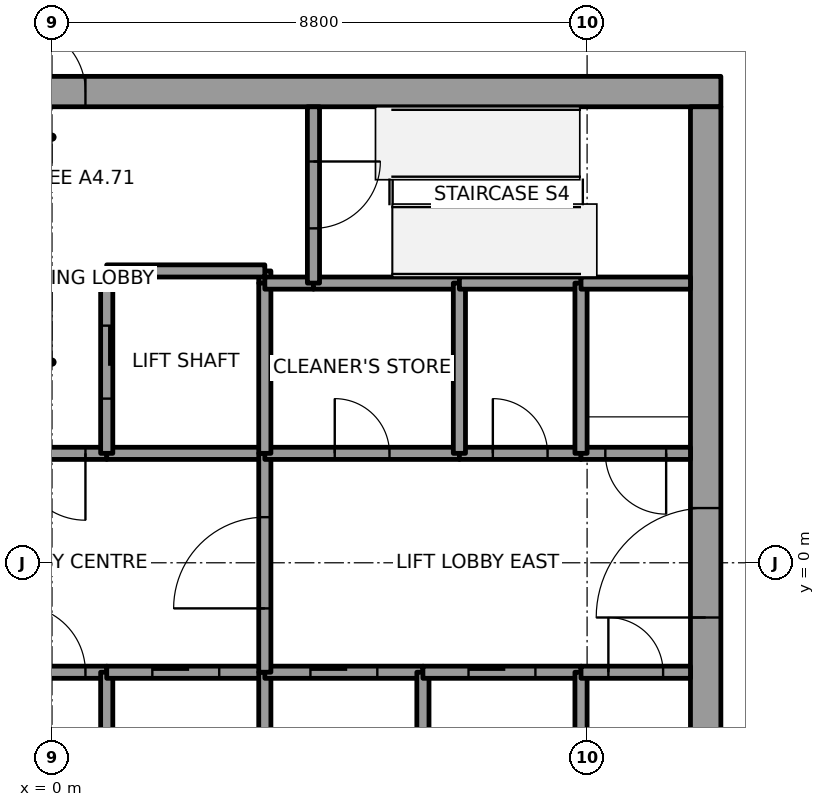
"""IFC4 building model, lengths in metres.
Left out: names, types, materials, properties, quantities, classifications, styles, units other than length and angle.
Written with IfcOpenShell. Run it as: python <this file> out.ifc"""

import sys

from ifc_helpers import new_model, si_unit, direction, frame, frame_2d, origin, place, context, subcontext, project, spatial, rectangle, extrude, element, fill, save


model = new_model("IFC4")
c1 = context("Model", 3, precision=1e-05, world=origin(), true_north=direction((0.0, 1.0)))
c2 = subcontext(c1, "Body", "Model", "MODEL_VIEW")
j1 = project(units=[si_unit("LENGTHUNIT", "METRE"), si_unit("PLANEANGLEUNIT", "RADIAN")], contexts=[c1])
p1 = place(None, origin())
s1 = spatial("IfcSite", under=j1, at=p1, CompositionType="ELEMENT")
p2 = place(p1, origin())
s2 = spatial("IfcBuilding", under=s1, at=p2, CompositionType="ELEMENT")
p3 = place(p2, frame((0.0, 0.0, 303.0)))
s3 = spatial("IfcBuildingStorey", under=s2, at=p3, CompositionType="ELEMENT", Elevation=303.0)
p4 = place(p3, frame((-11.0, 7.75, 0.0), z_axis=(0.0, 0.0, 1.0), x_axis=(1.0, 0.0, 0.0)))
e1 = element("IfcWall", 1, at=p4, inside=s3, PredefinedType="SHEAR", context=c2, shape_type="SweptSolid", body=[
    extrude(rectangle(XDim=22.0, YDim=0.5, at=frame_2d((11.0, 0.0))), origin(), (0.0, 0.0, 1.0), 4.0),
])
p5 = place(p4, frame((10.45, 0.0, 0.0)))
e2 = element("IfcOpeningElement", 2, at=p5, cuts=e1, PredefinedType="OPENING", context=c2, shape_type="SweptSolid", body=[
    extrude(rectangle(XDim=1.1, YDim=2.1, at=frame_2d((0.55, 1.05))), frame((0.0, 0.25, 0.0), z_axis=(0.0, -1.0, 0.0), x_axis=(1.0, 0.0, 0.0)), (0.0, 0.0, 1.0), 0.5),
])
p6 = place(p3, frame((10.75, -7.5, 0.0), z_axis=(0.0, 0.0, 1.0), x_axis=(0.0, 1.0, 0.0)))
e3 = element("IfcWall", 3, at=p6, inside=s3, PredefinedType="SHEAR", context=c2, shape_type="SweptSolid", body=[
    extrude(rectangle(XDim=15.0, YDim=0.5, at=frame_2d((7.5, 0.0))), origin(), (0.0, 0.0, 1.0), 4.0),
])
p7 = place(p6, frame((6.6, 0.0, 0.0)))
e4 = element("IfcOpeningElement", 4, at=p7, cuts=e3, PredefinedType="OPENING", context=c2, shape_type="SweptSolid", body=[
    extrude(rectangle(XDim=1.8, YDim=2.1, at=frame_2d((0.9, 1.05))), frame((0.0, 0.25, 0.0), z_axis=(0.0, -1.0, 0.0), x_axis=(1.0, 0.0, 0.0)), (0.0, 0.0, 1.0), 0.5),
])
p8 = place(p3, frame((-0.9, -1.8, 0.0), z_axis=(0.0, 0.0, 1.0), x_axis=(1.0, 0.0, 0.0)))
e5 = element("IfcWall", 5, at=p8, inside=s3, PredefinedType="SOLIDWALL", context=c2, shape_type="SweptSolid", body=[
    extrude(rectangle(XDim=1.8, YDim=0.2, at=frame_2d((0.9, 0.0))), origin(), (0.0, 0.0, 1.0), 3.85),
])
p9 = place(p8, frame((0.35, 0.0, 0.0)))
e6 = element("IfcOpeningElement", 6, at=p9, cuts=e5, PredefinedType="OPENING", context=c2, shape_type="SweptSolid", body=[
    extrude(rectangle(XDim=1.1, YDim=2.1, at=frame_2d((0.55, 1.05))), frame((0.0, 0.1, 0.0), z_axis=(0.0, -1.0, 0.0), x_axis=(1.0, 0.0, 0.0)), (0.0, 0.0, 1.0), 0.2),
])
p10 = place(p3, frame((0.9, 1.8, 0.0), z_axis=(0.0, 0.0, 1.0), x_axis=(-1.0, 0.0, 0.0)))
e7 = element("IfcWall", 7, at=p10, inside=s3, PredefinedType="SOLIDWALL", context=c2, shape_type="SweptSolid", body=[
    extrude(rectangle(XDim=1.8, YDim=0.2, at=frame_2d((0.9, 0.0))), origin(), (0.0, 0.0, 1.0), 3.85),
])
p11 = place(p10, frame((0.35, 0.0, 0.0)))
e8 = element("IfcOpeningElement", 8, at=p11, cuts=e7, PredefinedType="OPENING", context=c2, shape_type="SweptSolid", body=[
    extrude(rectangle(XDim=1.1, YDim=2.1, at=frame_2d((0.55, 1.05))), frame((0.0, 0.1, 0.0), z_axis=(0.0, -1.0, 0.0), x_axis=(1.0, 0.0, 0.0)), (0.0, 0.0, 1.0), 0.2),
])
p12 = place(p3, frame((0.9, -1.8, 0.0), z_axis=(0.0, 0.0, 1.0), x_axis=(0.0, -1.0, 0.0)))
e9 = element("IfcWall", 9, at=p12, inside=s3, PredefinedType="SOLIDWALL", context=c2, shape_type="SweptSolid", body=[
    extrude(rectangle(XDim=2.8, YDim=0.2, at=frame_2d((1.4, 0.0))), origin(), (0.0, 0.0, 1.0), 3.85),
])
p13 = place(p3, frame((0.9, -1.8, 0.0), z_axis=(0.0, 0.0, 1.0), x_axis=(1.0, 0.0, 0.0)))
e10 = element("IfcWall", 10, at=p13, inside=s3, PredefinedType="SOLIDWALL", context=c2, shape_type="SweptSolid", body=[
    extrude(rectangle(XDim=2.6, YDim=0.2, at=frame_2d((1.3, 0.0))), origin(), (0.0, 0.0, 1.0), 3.85),
])
p14 = place(p13, frame((0.75, 0.0, 0.0)))
e11 = element("IfcOpeningElement", 11, at=p14, cuts=e10, PredefinedType="OPENING", context=c2, shape_type="SweptSolid", body=[
    extrude(rectangle(XDim=1.1, YDim=2.1, at=frame_2d((0.55, 1.05))), frame((0.0, 0.1, 0.0), z_axis=(0.0, -1.0, 0.0), x_axis=(1.0, 0.0, 0.0)), (0.0, 0.0, 1.0), 0.2),
])
p15 = place(p3, frame((3.5, 1.8, 0.0), z_axis=(0.0, 0.0, 1.0), x_axis=(-1.0, 0.0, 0.0)))
e12 = element("IfcWall", 12, at=p15, inside=s3, PredefinedType="SOLIDWALL", context=c2, shape_type="SweptSolid", body=[
    extrude(rectangle(XDim=2.6, YDim=0.2, at=frame_2d((1.3, 0.0))), origin(), (0.0, 0.0, 1.0), 3.85),
])
p16 = place(p3, frame((3.5, 4.6, 0.0), z_axis=(0.0, 0.0, 1.0), x_axis=(0.0, 1.0, 0.0)))
e13 = element("IfcWall", 13, at=p16, inside=s3, PredefinedType="SOLIDWALL", context=c2, shape_type="SweptSolid", body=[
    extrude(rectangle(XDim=0.2, YDim=0.2, at=frame_2d((0.1, 0.0))), origin(), (0.0, 0.0, 1.0), 3.85),
])
p17 = place(p3, frame((3.5, 4.8, 0.0), z_axis=(0.0, 0.0, 1.0), x_axis=(-1.0, 0.0, 0.0)))
e14 = element("IfcWall", 14, at=p17, inside=s3, PredefinedType="SOLIDWALL", context=c2, shape_type="SweptSolid", body=[
    extrude(rectangle(XDim=2.6, YDim=0.2, at=frame_2d((1.3, 0.0))), origin(), (0.0, 0.0, 1.0), 3.85),
])
p18 = place(p3, frame((0.9, 4.8, 0.0), z_axis=(0.0, 0.0, 1.0), x_axis=(0.0, -1.0, 0.0)))
e15 = element("IfcWall", 15, at=p18, inside=s3, PredefinedType="SOLIDWALL", context=c2, shape_type="SweptSolid", body=[
    extrude(rectangle(XDim=3.0, YDim=0.2, at=frame_2d((1.5, 0.0))), origin(), (0.0, 0.0, 1.0), 3.85),
])
p19 = place(p18, frame((0.9, 0.0, 0.0)))
e16 = element("IfcOpeningElement", 16, at=p19, cuts=e15, PredefinedType="OPENING", context=c2, shape_type="SweptSolid", body=[
    extrude(rectangle(XDim=1.2, YDim=2.1, at=frame_2d((0.6, 1.05))), frame((0.0, 0.1, 0.0), z_axis=(0.0, -1.0, 0.0), x_axis=(1.0, 0.0, 0.0)), (0.0, 0.0, 1.0), 0.2),
])
p20 = place(p3, frame((3.5, -4.6, 0.0), z_axis=(0.0, 0.0, 1.0), x_axis=(0.0, 1.0, 0.0)))
e17 = element("IfcWall", 17, at=p20, inside=s3, PredefinedType="SOLIDWALL", context=c2, shape_type="SweptSolid", body=[
    extrude(rectangle(XDim=2.8, YDim=0.2, at=frame_2d((1.4, 0.0))), origin(), (0.0, 0.0, 1.0), 3.85),
])
p21 = place(p3, frame((3.5, -1.8, 0.0), z_axis=(0.0, 0.0, 1.0), x_axis=(1.0, 0.0, 0.0)))
e18 = element("IfcWall", 18, at=p21, inside=s3, PredefinedType="SOLIDWALL", context=c2, shape_type="SweptSolid", body=[
    extrude(rectangle(XDim=2.6, YDim=0.2, at=frame_2d((1.3, 0.0))), origin(), (0.0, 0.0, 1.0), 3.85),
])
p22 = place(p21, frame((0.75, 0.0, 0.0)))
e19 = element("IfcOpeningElement", 19, at=p22, cuts=e18, PredefinedType="OPENING", context=c2, shape_type="SweptSolid", body=[
    extrude(rectangle(XDim=1.1, YDim=2.1, at=frame_2d((0.55, 1.05))), frame((0.0, 0.1, 0.0), z_axis=(0.0, -1.0, 0.0), x_axis=(1.0, 0.0, 0.0)), (0.0, 0.0, 1.0), 0.2),
])
p23 = place(p3, frame((3.5, -1.8, 0.0), z_axis=(0.0, 0.0, 1.0), x_axis=(0.0, 1.0, 0.0)))
e20 = element("IfcWall", 20, at=p23, inside=s3, PredefinedType="SOLIDWALL", context=c2, shape_type="SweptSolid", body=[
    extrude(rectangle(XDim=3.6, YDim=0.2, at=frame_2d((1.8, 0.0))), origin(), (0.0, 0.0, 1.0), 3.85),
])
p24 = place(p23, frame((1.05, 0.0, 0.0)))
e21 = element("IfcOpeningElement", 21, at=p24, cuts=e20, PredefinedType="OPENING", context=c2, shape_type="SweptSolid", body=[
    extrude(rectangle(XDim=1.5, YDim=2.1, at=frame_2d((0.75, 1.05))), frame((0.0, 0.1, 0.0), z_axis=(0.0, -1.0, 0.0), x_axis=(1.0, 0.0, 0.0)), (0.0, 0.0, 1.0), 0.2),
])
p25 = place(p3, frame((3.5, 1.8, 0.0), z_axis=(0.0, 0.0, 1.0), x_axis=(1.0, 0.0, 0.0)))
e22 = element("IfcWall", 22, at=p25, inside=s3, PredefinedType="SOLIDWALL", context=c2, shape_type="SweptSolid", body=[
    extrude(rectangle(XDim=3.2, YDim=0.2, at=frame_2d((1.6, 0.0))), origin(), (0.0, 0.0, 1.0), 3.85),
])
p26 = place(p25, frame((1.15, 0.0, 0.0)))
e23 = element("IfcOpeningElement", 23, at=p26, cuts=e22, PredefinedType="OPENING", context=c2, shape_type="SweptSolid", body=[
    extrude(rectangle(XDim=0.9, YDim=2.1, at=frame_2d((0.45, 1.05))), frame((0.0, 0.1, 0.0), z_axis=(0.0, -1.0, 0.0), x_axis=(1.0, 0.0, 0.0)), (0.0, 0.0, 1.0), 0.2),
])
p27 = place(p3, frame((3.5, 4.6, 0.0), z_axis=(0.0, 0.0, 1.0), x_axis=(0.0, -1.0, 0.0)))
e24 = element("IfcWall", 24, at=p27, inside=s3, PredefinedType="SOLIDWALL", context=c2, shape_type="SweptSolid", body=[
    extrude(rectangle(XDim=2.8, YDim=0.2, at=frame_2d((1.4, 0.0))), origin(), (0.0, 0.0, 1.0), 3.85),
])
p28 = place(p3, frame((4.3, 4.6, 0.0), z_axis=(0.0, 0.0, 1.0), x_axis=(-1.0, 0.0, 0.0)))
e25 = element("IfcWall", 25, at=p28, inside=s3, PredefinedType="SOLIDWALL", context=c2, shape_type="SweptSolid", body=[
    extrude(rectangle(XDim=0.8, YDim=0.2, at=frame_2d((0.4, 0.0))), origin(), (0.0, 0.0, 1.0), 3.85),
])
p29 = place(p3, frame((6.7, 4.6, 0.0), z_axis=(0.0, 0.0, 1.0), x_axis=(-1.0, 0.0, 0.0)))
e26 = element("IfcWall", 26, at=p29, inside=s3, PredefinedType="SOLIDWALL", context=c2, shape_type="SweptSolid", body=[
    extrude(rectangle(XDim=2.4, YDim=0.2, at=frame_2d((1.2, 0.0))), origin(), (0.0, 0.0, 1.0), 3.85),
])
p30 = place(p3, frame((4.3, 7.5, 0.0), z_axis=(0.0, 0.0, 1.0), x_axis=(0.0, -1.0, 0.0)))
e27 = element("IfcWall", 27, at=p30, inside=s3, PredefinedType="SOLIDWALL", context=c2, shape_type="SweptSolid", body=[
    extrude(rectangle(XDim=2.9, YDim=0.2, at=frame_2d((1.45, 0.0))), origin(), (0.0, 0.0, 1.0), 3.85),
])
p31 = place(p30, frame((0.9, 0.0, 0.0)))
e28 = element("IfcOpeningElement", 28, at=p31, cuts=e27, PredefinedType="OPENING", context=c2, shape_type="SweptSolid", body=[
    extrude(rectangle(XDim=1.1, YDim=2.1, at=frame_2d((0.55, 1.05))), frame((0.0, 0.1, 0.0), z_axis=(0.0, -1.0, 0.0), x_axis=(1.0, 0.0, 0.0)), (0.0, 0.0, 1.0), 0.2),
])
p32 = place(p3, frame((6.1, -4.6, 0.0), z_axis=(0.0, 0.0, 1.0), x_axis=(0.0, 1.0, 0.0)))
e29 = element("IfcWall", 29, at=p32, inside=s3, PredefinedType="SOLIDWALL", context=c2, shape_type="SweptSolid", body=[
    extrude(rectangle(XDim=2.8, YDim=0.2, at=frame_2d((1.4, 0.0))), origin(), (0.0, 0.0, 1.0), 3.85),
])
p33 = place(p3, frame((6.1, -1.8, 0.0), z_axis=(0.0, 0.0, 1.0), x_axis=(1.0, 0.0, 0.0)))
e30 = element("IfcWall", 30, at=p33, inside=s3, PredefinedType="SOLIDWALL", context=c2, shape_type="SweptSolid", body=[
    extrude(rectangle(XDim=2.6, YDim=0.2, at=frame_2d((1.3, 0.0))), origin(), (0.0, 0.0, 1.0), 3.85),
])
p34 = place(p33, frame((0.75, 0.0, 0.0)))
e31 = element("IfcOpeningElement", 31, at=p34, cuts=e30, PredefinedType="OPENING", context=c2, shape_type="SweptSolid", body=[
    extrude(rectangle(XDim=1.1, YDim=2.1, at=frame_2d((0.55, 1.05))), frame((0.0, 0.1, 0.0), z_axis=(0.0, -1.0, 0.0), x_axis=(1.0, 0.0, 0.0)), (0.0, 0.0, 1.0), 0.2),
])
p35 = place(p3, frame((6.7, 1.8, 0.0), z_axis=(0.0, 0.0, 1.0), x_axis=(1.0, 0.0, 0.0)))
e32 = element("IfcWall", 32, at=p35, inside=s3, PredefinedType="SOLIDWALL", context=c2, shape_type="SweptSolid", body=[
    extrude(rectangle(XDim=2.0, YDim=0.2, at=frame_2d((1.0, 0.0))), origin(), (0.0, 0.0, 1.0), 3.85),
])
p36 = place(p35, frame((0.55, 0.0, 0.0)))
e33 = element("IfcOpeningElement", 33, at=p36, cuts=e32, PredefinedType="OPENING", context=c2, shape_type="SweptSolid", body=[
    extrude(rectangle(XDim=0.9, YDim=2.1, at=frame_2d((0.45, 1.05))), frame((0.0, 0.1, 0.0), z_axis=(0.0, -1.0, 0.0), x_axis=(1.0, 0.0, 0.0)), (0.0, 0.0, 1.0), 0.2),
])
p37 = place(p3, frame((6.7, 1.8, 0.0), z_axis=(0.0, 0.0, 1.0), x_axis=(0.0, 1.0, 0.0)))
e34 = element("IfcWall", 34, at=p37, inside=s3, PredefinedType="SOLIDWALL", context=c2, shape_type="SweptSolid", body=[
    extrude(rectangle(XDim=2.8, YDim=0.2, at=frame_2d((1.4, 0.0))), origin(), (0.0, 0.0, 1.0), 3.85),
])
p38 = place(p3, frame((8.7, 4.6, 0.0), z_axis=(0.0, 0.0, 1.0), x_axis=(-1.0, 0.0, 0.0)))
e35 = element("IfcWall", 35, at=p38, inside=s3, PredefinedType="SOLIDWALL", context=c2, shape_type="SweptSolid", body=[
    extrude(rectangle(XDim=2.0, YDim=0.2, at=frame_2d((1.0, 0.0))), origin(), (0.0, 0.0, 1.0), 3.85),
])
p39 = place(p3, frame((8.7, -1.8, 0.0), z_axis=(0.0, 0.0, 1.0), x_axis=(0.0, -1.0, 0.0)))
e36 = element("IfcWall", 36, at=p39, inside=s3, PredefinedType="SOLIDWALL", context=c2, shape_type="SweptSolid", body=[
    extrude(rectangle(XDim=2.8, YDim=0.2, at=frame_2d((1.4, 0.0))), origin(), (0.0, 0.0, 1.0), 3.85),
])
p40 = place(p3, frame((8.7, -1.8, 0.0), z_axis=(0.0, 0.0, 1.0), x_axis=(1.0, 0.0, 0.0)))
e37 = element("IfcWall", 37, at=p40, inside=s3, PredefinedType="SOLIDWALL", context=c2, shape_type="SweptSolid", body=[
    extrude(rectangle(XDim=1.8, YDim=0.2, at=frame_2d((0.9, 0.0))), origin(), (0.0, 0.0, 1.0), 3.85),
])
p41 = place(p40, frame((0.45, 0.0, 0.0)))
e38 = element("IfcOpeningElement", 38, at=p41, cuts=e37, PredefinedType="OPENING", context=c2, shape_type="SweptSolid", body=[
    extrude(rectangle(XDim=0.9, YDim=2.1, at=frame_2d((0.45, 1.05))), frame((0.0, 0.1, 0.0), z_axis=(0.0, -1.0, 0.0), x_axis=(1.0, 0.0, 0.0)), (0.0, 0.0, 1.0), 0.2),
])
p42 = place(p3, frame((10.5, 1.8, 0.0), z_axis=(0.0, 0.0, 1.0), x_axis=(-1.0, 0.0, 0.0)))
e39 = element("IfcWall", 39, at=p42, inside=s3, PredefinedType="SOLIDWALL", context=c2, shape_type="SweptSolid", body=[
    extrude(rectangle(XDim=1.8, YDim=0.2, at=frame_2d((0.9, 0.0))), origin(), (0.0, 0.0, 1.0), 3.85),
])
p43 = place(p42, frame((0.4, 0.0, 0.0)))
e40 = element("IfcOpeningElement", 40, at=p43, cuts=e39, PredefinedType="OPENING", context=c2, shape_type="SweptSolid", body=[
    extrude(rectangle(XDim=1.0, YDim=2.1, at=frame_2d((0.5, 1.05))), frame((0.0, 0.1, 0.0), z_axis=(0.0, -1.0, 0.0), x_axis=(1.0, 0.0, 0.0)), (0.0, 0.0, 1.0), 0.2),
])
p44 = place(p3, frame((8.7, 1.8, 0.0), z_axis=(0.0, 0.0, 1.0), x_axis=(0.0, 1.0, 0.0)))
e41 = element("IfcWall", 41, at=p44, inside=s3, PredefinedType="SOLIDWALL", context=c2, shape_type="SweptSolid", body=[
    extrude(rectangle(XDim=2.8, YDim=0.2, at=frame_2d((1.4, 0.0))), origin(), (0.0, 0.0, 1.0), 3.85),
])
p45 = place(p3, frame((10.5, 4.6, 0.0), z_axis=(0.0, 0.0, 1.0), x_axis=(-1.0, 0.0, 0.0)))
e42 = element("IfcWall", 42, at=p45, inside=s3, PredefinedType="SOLIDWALL", context=c2, shape_type="SweptSolid", body=[
    extrude(rectangle(XDim=1.8, YDim=0.2, at=frame_2d((0.9, 0.0))), origin(), (0.0, 0.0, 1.0), 3.85),
])
p46 = place(p14, origin())
e43 = element("IfcDoor", 43, at=p46, inside=s3, OperationType="SLIDING_TO_RIGHT", PredefinedType="DOOR", context=c2, shape_type="SweptSolid", body=[
    extrude(rectangle(XDim=1.1, YDim=2.1, at=frame_2d((0.55, 1.05))), frame((0.0, 0.025, 0.0), z_axis=(0.0, -1.0, 0.0), x_axis=(1.0, 0.0, 0.0)), (0.0, 0.0, 1.0), 0.05),
])
fill(e11, e43)
p47 = place(p22, origin())
e44 = element("IfcDoor", 44, at=p47, inside=s3, OperationType="SLIDING_TO_RIGHT", PredefinedType="DOOR", context=c2, shape_type="SweptSolid", body=[
    extrude(rectangle(XDim=1.1, YDim=2.1, at=frame_2d((0.55, 1.05))), frame((0.0, 0.025, 0.0), z_axis=(0.0, -1.0, 0.0), x_axis=(1.0, 0.0, 0.0)), (0.0, 0.0, 1.0), 0.05),
])
fill(e19, e44)
p48 = place(p34, origin())
e45 = element("IfcDoor", 45, at=p48, inside=s3, OperationType="SLIDING_TO_LEFT", PredefinedType="DOOR", context=c2, shape_type="SweptSolid", body=[
    extrude(rectangle(XDim=1.1, YDim=2.1, at=frame_2d((0.55, 1.05))), frame((0.0, 0.025, 0.0), z_axis=(0.0, -1.0, 0.0), x_axis=(1.0, 0.0, 0.0)), (0.0, 0.0, 1.0), 0.05),
])
fill(e31, e45)
p49 = place(p19, origin())
e46 = element("IfcDoor", 46, at=p49, inside=s3, OperationType="SLIDING_TO_LEFT", PredefinedType="DOOR", context=c2, shape_type="SweptSolid", body=[
    extrude(rectangle(XDim=1.2, YDim=2.1, at=frame_2d((0.6, 1.05))), frame((0.0, 0.025, 0.0), z_axis=(0.0, -1.0, 0.0), x_axis=(1.0, 0.0, 0.0)), (0.0, 0.0, 1.0), 0.05),
])
fill(e16, e46)
p50 = place(p24, origin())
e47 = element("IfcDoor", 47, at=p50, inside=s3, OperationType="DOUBLE_DOOR_SINGLE_SWING", PredefinedType="DOOR", context=c2, shape_type="SweptSolid", body=[
    extrude(rectangle(XDim=1.5, YDim=2.1, at=frame_2d((0.75, 1.05))), frame((0.0, 0.025, 0.0), z_axis=(0.0, -1.0, 0.0), x_axis=(1.0, 0.0, 0.0)), (0.0, 0.0, 1.0), 0.05),
])
fill(e21, e47)
p51 = place(p11, origin())
e48 = element("IfcDoor", 48, at=p51, inside=s3, OperationType="SINGLE_SWING_LEFT", PredefinedType="DOOR", context=c2, shape_type="SweptSolid", body=[
    extrude(rectangle(XDim=1.1, YDim=2.1, at=frame_2d((0.55, 1.05))), frame((0.0, 0.025, 0.0), z_axis=(0.0, -1.0, 0.0), x_axis=(1.0, 0.0, 0.0)), (0.0, 0.0, 1.0), 0.05),
])
fill(e8, e48)
p52 = place(p9, origin())
e49 = element("IfcDoor", 49, at=p52, inside=s3, OperationType="SINGLE_SWING_LEFT", PredefinedType="DOOR", context=c2, shape_type="SweptSolid", body=[
    extrude(rectangle(XDim=1.1, YDim=2.1, at=frame_2d((0.55, 1.05))), frame((0.0, 0.025, 0.0), z_axis=(0.0, -1.0, 0.0), x_axis=(1.0, 0.0, 0.0)), (0.0, 0.0, 1.0), 0.05),
])
fill(e6, e49)
p53 = place(p43, origin())
e50 = element("IfcDoor", 50, at=p53, inside=s3, OperationType="SINGLE_SWING_LEFT", PredefinedType="DOOR", context=c2, shape_type="SweptSolid", body=[
    extrude(rectangle(XDim=1.0, YDim=2.1, at=frame_2d((0.5, 1.05))), frame((0.0, 0.025, 0.0), z_axis=(0.0, -1.0, 0.0), x_axis=(1.0, 0.0, 0.0)), (0.0, 0.0, 1.0), 0.05),
])
fill(e40, e50)
p54 = place(p31, origin())
e51 = element("IfcDoor", 51, at=p54, inside=s3, OperationType="SINGLE_SWING_RIGHT", PredefinedType="DOOR", context=c2, shape_type="SweptSolid", body=[
    extrude(rectangle(XDim=1.1, YDim=2.1, at=frame_2d((0.55, 1.05))), frame((0.0, 0.025, 0.0), z_axis=(0.0, -1.0, 0.0), x_axis=(1.0, 0.0, 0.0)), (0.0, 0.0, 1.0), 0.05),
])
fill(e28, e51)
p55 = place(p26, origin())
e52 = element("IfcDoor", 52, at=p55, inside=s3, OperationType="SINGLE_SWING_LEFT", PredefinedType="DOOR", context=c2, shape_type="SweptSolid", body=[
    extrude(rectangle(XDim=0.9, YDim=2.1, at=frame_2d((0.45, 1.05))), frame((0.0, 0.025, 0.0), z_axis=(0.0, -1.0, 0.0), x_axis=(1.0, 0.0, 0.0)), (0.0, 0.0, 1.0), 0.05),
])
fill(e23, e52)
p56 = place(p36, origin())
e53 = element("IfcDoor", 53, at=p56, inside=s3, OperationType="SINGLE_SWING_LEFT", PredefinedType="DOOR", context=c2, shape_type="SweptSolid", body=[
    extrude(rectangle(XDim=0.9, YDim=2.1, at=frame_2d((0.45, 1.05))), frame((0.0, 0.025, 0.0), z_axis=(0.0, -1.0, 0.0), x_axis=(1.0, 0.0, 0.0)), (0.0, 0.0, 1.0), 0.05),
])
fill(e33, e53)
p57 = place(p41, origin())
e54 = element("IfcDoor", 54, at=p57, inside=s3, OperationType="SINGLE_SWING_RIGHT", PredefinedType="DOOR", context=c2, shape_type="SweptSolid", body=[
    extrude(rectangle(XDim=0.9, YDim=2.1, at=frame_2d((0.45, 1.05))), frame((0.0, 0.025, 0.0), z_axis=(0.0, -1.0, 0.0), x_axis=(1.0, 0.0, 0.0)), (0.0, 0.0, 1.0), 0.05),
])
fill(e38, e54)
p58 = place(p7, origin())
e55 = element("IfcDoor", 55, at=p58, inside=s3, OperationType="DOUBLE_DOOR_SINGLE_SWING", PredefinedType="DOOR", context=c2, shape_type="SweptSolid", body=[
    extrude(rectangle(XDim=1.8, YDim=2.1, at=frame_2d((0.9, 1.05))), frame((0.0, 0.025, 0.0), z_axis=(0.0, -1.0, 0.0), x_axis=(1.0, 0.0, 0.0)), (0.0, 0.0, 1.0), 0.05),
])
fill(e4, e55)
p59 = place(p5, origin())
e56 = element("IfcDoor", 56, at=p59, inside=s3, OperationType="SINGLE_SWING_LEFT", PredefinedType="DOOR", context=c2, shape_type="SweptSolid", body=[
    extrude(rectangle(XDim=1.1, YDim=2.1, at=frame_2d((0.55, 1.05))), frame((0.0, 0.025, 0.0), z_axis=(0.0, -1.0, 0.0), x_axis=(1.0, 0.0, 0.0)), (0.0, 0.0, 1.0), 0.05),
])
fill(e2, e56)
save(model, sys.argv[1])
